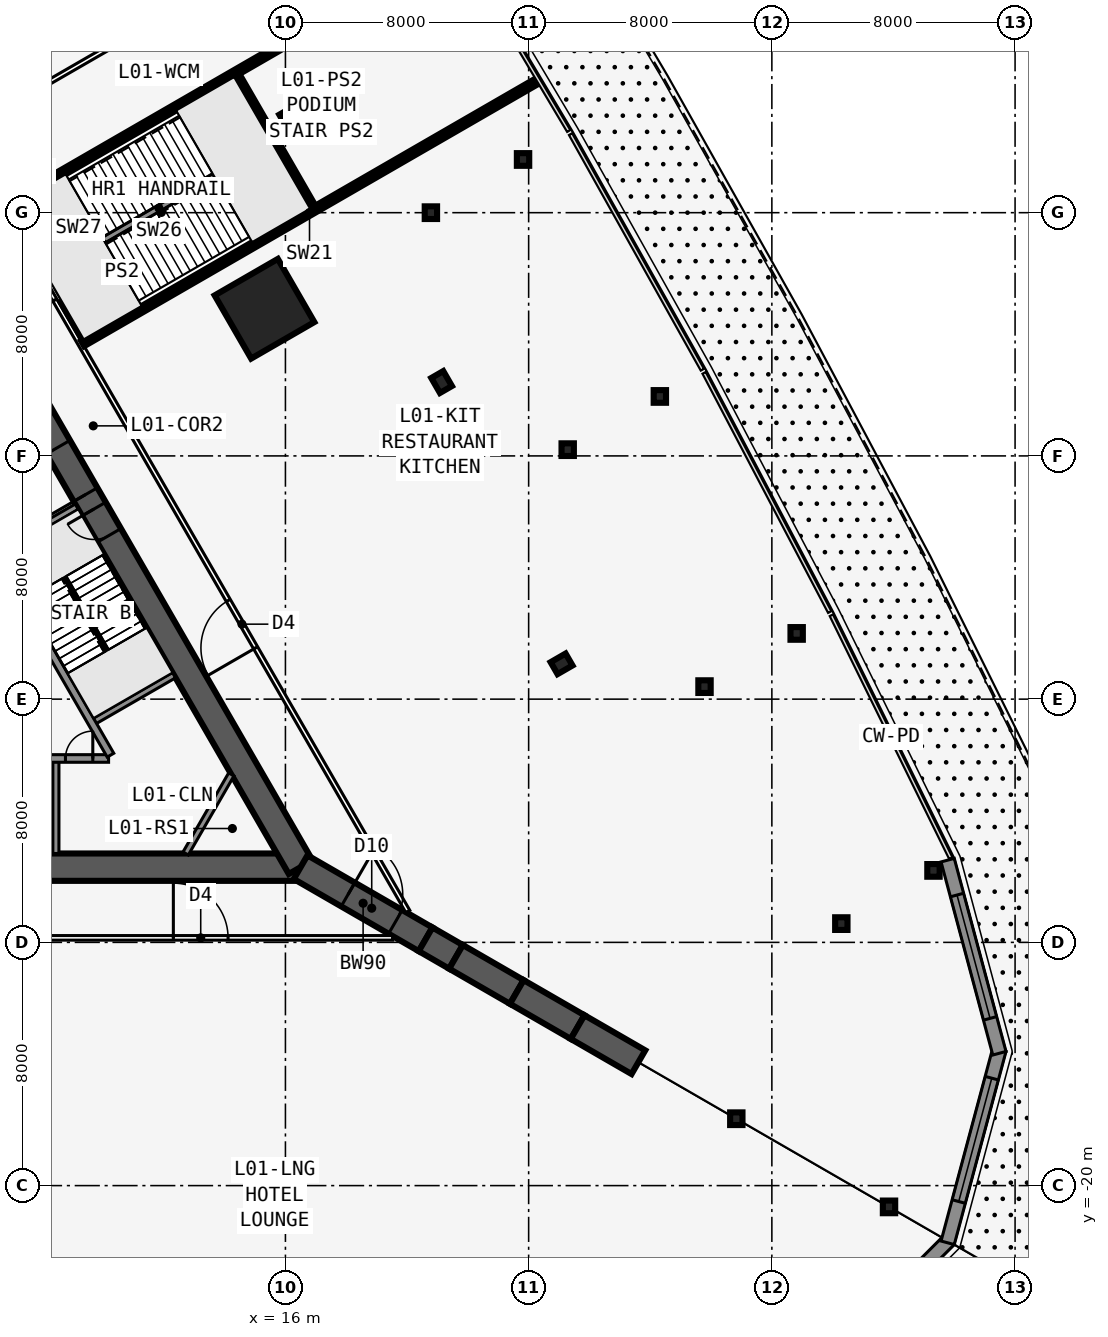
"""IFC4 building model, lengths in metres.
Left out: names, types, materials, properties, quantities, classifications, styles, units other than length and angle.
Written with IfcOpenShell. Run it as: python <this file> out.ifc"""

import sys

from ifc_helpers import new_model, si_unit, direction, frame, frame_2d, origin, origin_2d, place, context, subcontext, project, spatial, rectangle, i_section, extrude, element, fill, save


model = new_model("IFC4")
c1 = context("Model", 3, precision=1e-05, world=origin(), true_north=direction((0.0, 1.0)))
c2 = subcontext(c1, "Body", "Model", "MODEL_VIEW")
j1 = project(units=[si_unit("LENGTHUNIT", "METRE"), si_unit("PLANEANGLEUNIT", "RADIAN")], contexts=[c1])
p1 = place(None, origin())
s1 = spatial("IfcSite", under=j1, at=p1, CompositionType="ELEMENT")
p2 = place(p1, origin())
s2 = spatial("IfcBuilding", under=s1, at=p2, CompositionType="ELEMENT")
p3 = place(p2, frame((0.0, 0.0, 6.0)))
s3 = spatial("IfcBuildingStorey", under=s2, at=p3, CompositionType="ELEMENT", Elevation=6.0)
p4 = place(p3, frame((-16.5, -9.526, 0.0), z_axis=(0.0, 0.0, 1.0), x_axis=(1.0, 0.0, 0.0)))
e1 = element("IfcWall", 1, at=p4, inside=s3, PredefinedType="SHEAR", context=c2, shape_type="SweptSolid", body=[
    extrude(rectangle(XDim=33.0, YDim=0.9, at=frame_2d((16.5, 0.0))), origin(), (0.0, 0.0, 1.0), 5.0),
])
p5 = place(p4, frame((14.05, 0.0, 0.0)))
e2 = element("IfcOpeningElement", 2, at=p5, cuts=e1, PredefinedType="OPENING", context=c2, shape_type="SweptSolid", body=[
    extrude(rectangle(XDim=1.8, YDim=2.13, at=frame_2d((0.9, 1.065))), frame((0.0, 0.46, 0.0), z_axis=(0.0, -1.0, 0.0), x_axis=(1.0, 0.0, 0.0)), (0.0, 0.0, 1.0), 0.92),
])
p6 = place(p3, frame((-0.55, -5.951, 0.0), z_axis=(0.0, 0.0, 1.0), x_axis=(1.0, 0.0, 0.0)))
e3 = element("IfcWall", 3, at=p6, inside=s3, PredefinedType="SOLIDWALL", context=c2, shape_type="SweptSolid", body=[
    extrude(rectangle(XDim=10.733, YDim=0.25, at=frame_2d((5.366, 0.0))), origin(), (0.0, 0.0, 1.0), 4.75),
])
p7 = place(p6, frame((9.314, 0.0, 0.0)))
e4 = element("IfcOpeningElement", 4, at=p7, cuts=e3, PredefinedType="OPENING", context=c2, shape_type="SweptSolid", body=[
    extrude(rectangle(XDim=0.9, YDim=2.13, at=frame_2d((0.45, 1.065))), frame((0.0, 0.135, 0.0), z_axis=(0.0, -1.0, 0.0), x_axis=(1.0, 0.0, 0.0)), (0.0, 0.0, 1.0), 0.27),
])
p8 = place(p6, frame((1.05, 0.0, 0.0)))
e5 = element("IfcOpeningElement", 5, at=p8, cuts=e3, PredefinedType="OPENING", context=c2, shape_type="SweptSolid", body=[
    extrude(rectangle(XDim=1.1, YDim=2.13, at=frame_2d((0.55, 1.065))), frame((0.0, 0.135, 0.0), z_axis=(0.0, -1.0, 0.0), x_axis=(1.0, 0.0, 0.0)), (0.0, 0.0, 1.0), 0.27),
])
p9 = place(p6, frame((4.05, 0.0, 0.0)))
e6 = element("IfcOpeningElement", 6, at=p9, cuts=e3, PredefinedType="OPENING", context=c2, shape_type="SweptSolid", body=[
    extrude(rectangle(XDim=1.1, YDim=2.13, at=frame_2d((0.55, 1.065))), frame((0.0, 0.135, 0.0), z_axis=(0.0, -1.0, 0.0), x_axis=(1.0, 0.0, 0.0)), (0.0, 0.0, 1.0), 0.27),
])
p10 = place(p3, frame((8.45, -5.951, 0.0), z_axis=(0.0, 0.0, 1.0), x_axis=(0.0, -1.0, 0.0)))
e7 = element("IfcWall", 7, at=p10, inside=s3, PredefinedType="SOLIDWALL", context=c2, shape_type="SweptSolid", body=[
    extrude(rectangle(XDim=3.125, YDim=0.2, at=frame_2d((1.562, 0.0))), origin(), (0.0, 0.0, 1.0), 4.75),
])
p11 = place(p3, frame((16.5, -9.526, 0.0), z_axis=(0.0, 0.0, 1.0), x_axis=(-0.499999749417, 0.866025548458, 0.0)))
e8 = element("IfcWall", 8, at=p11, inside=s3, PredefinedType="SHEAR", context=c2, shape_type="SweptSolid", body=[
    extrude(rectangle(XDim=33.0, YDim=0.9, at=frame_2d((16.5, 0.0))), origin(), (0.0, 0.0, 1.0), 5.0),
])
p12 = place(p11, frame((14.15, 0.0, 0.0)))
e9 = element("IfcOpeningElement", 9, at=p12, cuts=e8, PredefinedType="OPENING", context=c2, shape_type="SweptSolid", body=[
    extrude(rectangle(XDim=1.8, YDim=2.13, at=frame_2d((0.9, 1.065))), frame((0.0, 0.46, 0.0), z_axis=(0.0, -1.0, 0.0), x_axis=(1.0, 0.0, 0.0)), (0.0, 0.0, 1.0), 0.92),
])
p13 = place(p11, frame((12.6, 0.0, 0.0)))
e10 = element("IfcOpeningElement", 10, at=p13, cuts=e8, PredefinedType="OPENING", context=c2, shape_type="SweptSolid", body=[
    extrude(rectangle(XDim=1.0, YDim=2.13, at=frame_2d((0.5, 1.065))), frame((0.0, 0.46, 0.0), z_axis=(0.0, -1.0, 0.0), x_axis=(1.0, 0.0, 0.0)), (0.0, 0.0, 1.0), 0.92),
])
p14 = place(p3, frame((10.245, -5.843, 0.0), z_axis=(0.0, 0.0, 1.0), x_axis=(-0.499993009313, 0.866029439822, 0.0)))
e11 = element("IfcWall", 11, at=p14, inside=s3, PredefinedType="SOLIDWALL", context=c2, shape_type="SweptSolid", body=[
    extrude(rectangle(XDim=7.733, YDim=0.25, at=frame_2d((3.866, 0.0))), origin(), (0.0, 0.0, 1.0), 4.75),
])
for number, where, z_axis, x_axis in (
    (12, (9.629, -4.775, 0.0), (0.0, 0.0, 1.0), (0.866, 0.5, 0.0)),
    (13, (6.429, 0.767, 0.0), (0.0, 0.0, 1.0), (0.866, 0.5, 0.0)),
):
    element("IfcWall", number, at=place(p3, frame(where, z_axis=z_axis, x_axis=x_axis)), inside=s3, PredefinedType="SOLIDWALL", context=c2, shape_type="SweptSolid", body=[
        extrude(rectangle(XDim=3.125, YDim=0.2, at=frame_2d((1.562, 0.0))), origin(), (0.0, 0.0, 1.0), 4.75),
    ])
p15 = place(p3, frame((16.5, -9.526, 0.0), z_axis=(0.0, 0.0, 1.0), x_axis=(0.866031398331, -0.499989616998, 0.0)))
e14 = element("IfcWall", 14, at=p15, inside=s3, PredefinedType="SHEAR", context=c2, shape_type="SweptSolid", body=[
    extrude(rectangle(XDim=4.746, YDim=0.9, at=frame_2d((2.373, 0.0))), origin(), (0.0, 0.0, 1.0), 5.0),
])
p16 = place(p15, frame((1.8, 0.0, 0.0)))
e15 = element("IfcOpeningElement", 15, at=p16, cuts=e14, PredefinedType="OPENING", context=c2, shape_type="SweptSolid", body=[
    extrude(rectangle(XDim=1.8, YDim=2.13, at=frame_2d((0.9, 1.065))), frame((0.0, 0.46, 0.0), z_axis=(0.0, -1.0, 0.0), x_axis=(1.0, 0.0, 0.0)), (0.0, 0.0, 1.0), 0.92),
])
p17 = place(p3, frame((20.61, -11.899, 0.0), z_axis=(0.0, 0.0, 1.0), x_axis=(0.866009537788, -0.500027479704, 0.0)))
e16 = element("IfcWall", 16, at=p17, inside=s3, PredefinedType="SHEAR", context=c2, shape_type="SweptSolid", body=[
    extrude(rectangle(XDim=1.155, YDim=0.9, at=frame_2d((0.577, 0.0))), origin(), (0.0, 0.0, 1.0), 5.0),
])
for number, where, z_axis, x_axis in (
    (17, (21.61, -12.477, 0.0), (0.0, 0.0, 1.0), (0.866, -0.5, 0.0)),
    (18, (23.61, -13.631, 0.0), (0.0, 0.0, 1.0), (0.866, -0.5, 0.0)),
    (19, (25.61, -14.786, 0.0), (0.0, 0.0, 1.0), (0.866, -0.5, 0.0)),
):
    element("IfcWall", number, at=place(p3, frame(where, z_axis=z_axis, x_axis=x_axis)), inside=s3, PredefinedType="SHEAR", context=c2, shape_type="SweptSolid", body=[
        extrude(rectangle(XDim=2.309, YDim=0.9, at=frame_2d((1.155, 0.0))), origin(), (0.0, 0.0, 1.0), 5.0),
    ])
for number, where, z_axis, x_axis in (
    (20, (15.0, -20.303, 0.0), (0.0, 0.0, 1.0), (1.0, 0.0, 0.0)),
    (21, (25.083, -2.839, 0.0), (0.0, 0.0, 1.0), (-0.5, 0.866, 0.0)),
    (22, (21.137, 6.43, 0.0), (0.0, 0.0, 1.0), (0.866, 0.5, 0.0)),
    (23, (16.137, 15.09, 0.0), (0.0, 0.0, 1.0), (0.866, 0.5, 0.0)),
):
    element("IfcColumn", number, at=place(p3, frame(where, z_axis=z_axis, x_axis=x_axis)), inside=s3, PredefinedType="COLUMN", context=c2, shape_type="SweptSolid", body=[
        extrude(i_section(OverallWidth=0.455, OverallDepth=0.569, WebThickness=0.078, FlangeThickness=0.125, at=origin_2d()), origin(), (0.0, 0.0, 1.0), 5.0),
    ])
for number, where, z_axis, x_axis in (
    (24, (30.831, -17.8, 0.0), (0.0, 0.0, 1.0), (1.0, 0.0, 0.0)),
    (25, (35.854, -20.7, 0.0), (0.0, 0.0, 1.0), (1.0, 0.0, 0.0)),
    (26, (29.785, -3.588, 0.0), (0.0, 0.0, 1.0), (1.0, 0.0, 0.0)),
    (27, (34.285, -11.383, 0.0), (0.0, 0.0, 1.0), (1.0, 0.0, 0.0)),
    (28, (25.285, 4.206, 0.0), (0.0, 0.0, 1.0), (1.0, 0.0, 0.0)),
    (29, (20.785, 12.0, 0.0), (0.0, 0.0, 1.0), (1.0, 0.0, 0.0)),
    (30, (32.816, -1.838, 0.0), (0.0, 0.0, 1.0), (1.0, 0.0, 0.0)),
    (31, (37.316, -9.633, 0.0), (0.0, 0.0, 1.0), (1.0, 0.0, 0.0)),
    (32, (28.316, 5.956, 0.0), (0.0, 0.0, 1.0), (1.0, 0.0, 0.0)),
    (33, (23.816, 13.75, 0.0), (0.0, 0.0, 1.0), (1.0, 0.0, 0.0)),
):
    element("IfcColumn", number, at=place(p3, frame(where, z_axis=z_axis, x_axis=x_axis)), inside=s3, PredefinedType="COLUMN", context=c2, shape_type="SweptSolid", body=[
        extrude(i_section(OverallWidth=0.406, OverallDepth=0.417, WebThickness=0.03, FlangeThickness=0.048, at=origin_2d()), origin(), (0.0, 0.0, 1.0), 5.0),
    ])
p18 = place(p3, frame((15.312, 8.84, 0.0), z_axis=(0.0, 0.0, 1.0), x_axis=(0.866025403784, 0.5, 0.0)))
e34 = element("IfcColumn", 34, at=p18, inside=s3, PredefinedType="COLUMN", context=c2, shape_type="SweptSolid", body=[
    extrude(rectangle(XDim=2.4, YDim=2.4, at=origin_2d()), origin(), (0.0, 0.0, 1.0), 5.0),
])
p19 = place(p3, frame((33.192, -26.429, 0.0), z_axis=(0.0, 0.0, 1.0), x_axis=(0.7070882144, 0.707125347486, 0.0)))
e35 = element("IfcWall", 35, at=p19, inside=s3, PredefinedType="SOLIDWALL", context=c2, shape_type="SweptSolid", body=[
    extrude(rectangle(XDim=6.575, YDim=0.45, at=frame_2d((3.287, 0.0))), origin(), (0.0, 0.0, 1.0), 4.75),
])
p20 = place(p19, frame((0.969, 0.0, 0.6)))
e36 = element("IfcOpeningElement", 36, at=p20, cuts=e35, PredefinedType="OPENING", context=c2, shape_type="SweptSolid", body=[
    extrude(rectangle(XDim=4.2, YDim=3.2, at=frame_2d((2.1, 1.6))), frame((0.0, 0.235, 0.0), z_axis=(0.0, -1.0, 0.0), x_axis=(1.0, 0.0, 0.0)), (0.0, 0.0, 1.0), 0.47),
])
p21 = place(p3, frame((37.783, -21.881, 0.0), z_axis=(0.0, 0.0, 1.0), x_axis=(0.258813420722, 0.96592733332, 0.0)))
e37 = element("IfcWall", 37, at=p21, inside=s3, PredefinedType="SOLIDWALL", context=c2, shape_type="SweptSolid", body=[
    extrude(rectangle(XDim=6.575, YDim=0.45, at=frame_2d((3.288, 0.0))), origin(), (0.0, 0.0, 1.0), 4.75),
])
p22 = place(p21, frame((1.406, 0.0, 0.6)))
e38 = element("IfcOpeningElement", 38, at=p22, cuts=e37, PredefinedType="OPENING", context=c2, shape_type="SweptSolid", body=[
    extrude(rectangle(XDim=4.2, YDim=3.2, at=frame_2d((2.1, 1.6))), frame((0.0, 0.235, 0.0), z_axis=(0.0, -1.0, 0.0), x_axis=(1.0, 0.0, 0.0)), (0.0, 0.0, 1.0), 0.47),
])
p23 = place(p3, frame((39.484, -15.647, 0.0), z_axis=(0.0, 0.0, 1.0), x_axis=(-0.258813420722, 0.96592733332, 0.0)))
e39 = element("IfcWall", 39, at=p23, inside=s3, PredefinedType="SOLIDWALL", context=c2, shape_type="SweptSolid", body=[
    extrude(rectangle(XDim=6.575, YDim=0.45, at=frame_2d((3.288, 0.0))), origin(), (0.0, 0.0, 1.0), 4.75),
])
p24 = place(p23, frame((1.188, 0.0, 0.6)))
e40 = element("IfcOpeningElement", 40, at=p24, cuts=e39, PredefinedType="OPENING", context=c2, shape_type="SweptSolid", body=[
    extrude(rectangle(XDim=4.2, YDim=3.2, at=frame_2d((2.1, 1.6))), frame((0.0, 0.235, 0.0), z_axis=(0.0, -1.0, 0.0), x_axis=(1.0, 0.0, 0.0)), (0.0, 0.0, 1.0), 0.47),
])
p25 = place(p3, frame((-19.527, -11.851, 0.0), z_axis=(0.0, 0.0, 1.0), x_axis=(1.0, 0.0, 0.0)))
e41 = element("IfcWall", 41, at=p25, inside=s3, PredefinedType="PARTITIONING", context=c2, shape_type="SweptSolid", body=[
    extrude(rectangle(XDim=39.054, YDim=0.15, at=frame_2d((19.527, 0.0))), origin(), (0.0, 0.0, 1.0), 3.808),
])
p26 = place(p25, frame((8.013, 0.0, 0.0)))
e42 = element("IfcOpeningElement", 42, at=p26, cuts=e41, PredefinedType="OPENING", context=c2, shape_type="SweptSolid", body=[
    extrude(rectangle(XDim=1.8, YDim=2.13, at=frame_2d((0.9, 1.065))), frame((0.0, 0.085, 0.0), z_axis=(0.0, -1.0, 0.0), x_axis=(1.0, 0.0, 0.0)), (0.0, 0.0, 1.0), 0.17),
])
p27 = place(p25, frame((18.627, 0.0, 0.0)))
e43 = element("IfcOpeningElement", 43, at=p27, cuts=e41, PredefinedType="OPENING", context=c2, shape_type="SweptSolid", body=[
    extrude(rectangle(XDim=1.8, YDim=2.13, at=frame_2d((0.9, 1.065))), frame((0.0, 0.085, 0.0), z_axis=(0.0, -1.0, 0.0), x_axis=(1.0, 0.0, 0.0)), (0.0, 0.0, 1.0), 0.17),
])
p28 = place(p25, frame((23.227, 0.0, 0.0)))
e44 = element("IfcOpeningElement", 44, at=p28, cuts=e41, PredefinedType="OPENING", context=c2, shape_type="SweptSolid", body=[
    extrude(rectangle(XDim=1.8, YDim=2.13, at=frame_2d((0.9, 1.065))), frame((0.0, 0.085, 0.0), z_axis=(0.0, -1.0, 0.0), x_axis=(1.0, 0.0, 0.0)), (0.0, 0.0, 1.0), 0.17),
])
p29 = place(p25, frame((31.841, 0.0, 0.0)))
e45 = element("IfcOpeningElement", 45, at=p29, cuts=e41, PredefinedType="OPENING", context=c2, shape_type="SweptSolid", body=[
    extrude(rectangle(XDim=1.8, YDim=2.13, at=frame_2d((0.9, 1.065))), frame((0.0, 0.085, 0.0), z_axis=(0.0, -1.0, 0.0), x_axis=(1.0, 0.0, 0.0)), (0.0, 0.0, 1.0), 0.17),
])
p30 = place(p3, frame((20.027, -10.985, 0.0), z_axis=(0.0, 0.0, 1.0), x_axis=(-0.500001677587, 0.866024435227, 0.0)))
e46 = element("IfcWall", 46, at=p30, inside=s3, PredefinedType="PARTITIONING", context=c2, shape_type="SweptSolid", body=[
    extrude(rectangle(XDim=39.054, YDim=0.15, at=frame_2d((19.527, 0.0))), origin(), (0.0, 0.0, 1.0), 3.808),
])
p31 = place(p30, frame((10.013, 0.0, 0.0)))
e47 = element("IfcOpeningElement", 47, at=p31, cuts=e46, PredefinedType="OPENING", context=c2, shape_type="SweptSolid", body=[
    extrude(rectangle(XDim=1.8, YDim=2.13, at=frame_2d((0.9, 1.065))), frame((0.0, 0.085, 0.0), z_axis=(0.0, -1.0, 0.0), x_axis=(1.0, 0.0, 0.0)), (0.0, 0.0, 1.0), 0.17),
])
p32 = place(p30, frame((23.227, 0.0, 0.0)))
e48 = element("IfcOpeningElement", 48, at=p32, cuts=e46, PredefinedType="OPENING", context=c2, shape_type="SweptSolid", body=[
    extrude(rectangle(XDim=1.8, YDim=2.13, at=frame_2d((0.9, 1.065))), frame((0.0, 0.085, 0.0), z_axis=(0.0, -1.0, 0.0), x_axis=(1.0, 0.0, 0.0)), (0.0, 0.0, 1.0), 0.17),
])
p33 = place(p30, frame((27.627, 0.0, 0.0)))
e49 = element("IfcOpeningElement", 49, at=p33, cuts=e46, PredefinedType="OPENING", context=c2, shape_type="SweptSolid", body=[
    extrude(rectangle(XDim=1.0, YDim=2.13, at=frame_2d((0.5, 1.065))), frame((0.0, 0.085, 0.0), z_axis=(0.0, -1.0, 0.0), x_axis=(1.0, 0.0, 0.0)), (0.0, 0.0, 1.0), 0.17),
])
p34 = place(p30, frame((30.527, 0.0, 0.0)))
e50 = element("IfcOpeningElement", 50, at=p34, cuts=e46, PredefinedType="OPENING", context=c2, shape_type="SweptSolid", body=[
    extrude(rectangle(XDim=1.0, YDim=2.13, at=frame_2d((0.5, 1.065))), frame((0.0, 0.085, 0.0), z_axis=(0.0, -1.0, 0.0), x_axis=(1.0, 0.0, 0.0)), (0.0, 0.0, 1.0), 0.17),
])
p35 = place(p30, frame((33.277, 0.0, 0.0)))
e51 = element("IfcOpeningElement", 51, at=p35, cuts=e46, PredefinedType="OPENING", context=c2, shape_type="SweptSolid", body=[
    extrude(rectangle(XDim=1.0, YDim=2.13, at=frame_2d((0.5, 1.065))), frame((0.0, 0.085, 0.0), z_axis=(0.0, -1.0, 0.0), x_axis=(1.0, 0.0, 0.0)), (0.0, 0.0, 1.0), 0.17),
])
p36 = place(p30, frame((36.39, 0.0, 0.0)))
e52 = element("IfcOpeningElement", 52, at=p36, cuts=e46, PredefinedType="OPENING", context=c2, shape_type="SweptSolid", body=[
    extrude(rectangle(XDim=1.0, YDim=2.13, at=frame_2d((0.5, 1.065))), frame((0.0, 0.085, 0.0), z_axis=(0.0, -1.0, 0.0), x_axis=(1.0, 0.0, 0.0)), (0.0, 0.0, 1.0), 0.17),
])
p37 = place(p3, frame((9.329, 7.695, 0.0), z_axis=(0.0, 0.0, 1.0), x_axis=(0.866030143687, 0.499991790157, 0.0)))
e53 = element("IfcWall", 53, at=p37, inside=s3, PredefinedType="SHEAR", context=c2, shape_type="SweptSolid", body=[
    extrude(rectangle(XDim=17.236, YDim=0.2, at=frame_2d((8.618, 0.0))), origin(), (0.0, 0.0, 1.0), 5.0),
])
p38 = place(p3, frame((6.729, 12.198, 0.0), z_axis=(0.0, 0.0, 1.0), x_axis=(0.866023831254, 0.500002723692, 0.0)))
e54 = element("IfcWall", 54, at=p38, inside=s3, PredefinedType="SHEAR", context=c2, shape_type="SweptSolid", body=[
    extrude(rectangle(XDim=17.167, YDim=0.2, at=frame_2d((8.583, 0.0))), origin(), (0.0, 0.0, 1.0), 5.0),
])
p39 = place(p3, frame((5.329, 14.623, 0.0), z_axis=(0.0, 0.0, 1.0), x_axis=(0.866023280993, 0.500003676764, 0.0)))
e55 = element("IfcWall", 55, at=p39, inside=s3, PredefinedType="PARTITIONING", context=c2, shape_type="SweptSolid", body=[
    extrude(rectangle(XDim=17.033, YDim=0.15, at=frame_2d((8.517, 0.0))), origin(), (0.0, 0.0, 1.0), 3.808),
])
p40 = place(p3, frame((3.829, 17.221, 0.0), z_axis=(0.0, 0.0, 1.0), x_axis=(0.86602357085, 0.500003174723, 0.0)))
e56 = element("IfcWall", 56, at=p40, inside=s3, PredefinedType="PARTITIONING", context=c2, shape_type="SweptSolid", body=[
    extrude(rectangle(XDim=16.914, YDim=0.15, at=frame_2d((8.457, 0.0))), origin(), (0.0, 0.0, 1.0), 4.75),
])
p41 = place(p3, frame((14.219, -6.476, 0.0), z_axis=(0.0, 0.0, 1.0), x_axis=(-0.499952404951, -0.866052881055, 0.0)))
e57 = element("IfcWall", 57, at=p41, inside=s3, PredefinedType="SOLIDWALL", context=c2, shape_type="SweptSolid", body=[
    extrude(rectangle(XDim=3.002, YDim=0.2, at=frame_2d((1.501, 0.0))), origin(), (0.0, 0.0, 1.0), 4.75),
])
p42 = place(p3, frame((10.135, -2.401, 0.0), z_axis=(0.0, 0.0, 1.0), x_axis=(-0.499992232847, 0.866029888106, 0.0)))
e58 = element("IfcWall", 58, at=p42, inside=s3, PredefinedType="SOLIDWALL", context=c2, shape_type="SweptSolid", body=[
    extrude(rectangle(XDim=2.794, YDim=0.1, at=frame_2d((1.397, 0.0))), origin(), (0.0, 0.0, 1.0), 5.0),
])
p43 = place(p3, frame((16.949, 12.095, 0.0), z_axis=(0.0, 0.0, 1.0), x_axis=(-0.499992051641, 0.866029992723, 0.0)))
e59 = element("IfcWall", 59, at=p43, inside=s3, PredefinedType="SHEAR", context=c2, shape_type="SweptSolid", body=[
    extrude(rectangle(XDim=5.2, YDim=0.2, at=frame_2d((2.6, 0.0))), origin(), (0.0, 0.0, 1.0), 5.0),
])
p44 = place(p3, frame((9.322, 7.807, 0.0), z_axis=(0.0, 0.0, 1.0), x_axis=(-0.500060622324, 0.86599040064, 0.0)))
e60 = element("IfcWall", 60, at=p44, inside=s3, PredefinedType="SOLIDWALL", context=c2, shape_type="SweptSolid", body=[
    extrude(rectangle(XDim=1.5, YDim=0.1, at=frame_2d((0.75, 0.0))), origin(), (0.0, 0.0, 1.0), 5.0),
])
p45 = place(p3, frame((10.023, 11.098, 0.0), z_axis=(0.0, 0.0, 1.0), x_axis=(0.866031452229, 0.49998952364, 0.0)))
e61 = element("IfcWall", 61, at=p45, inside=s3, PredefinedType="SOLIDWALL", context=c2, shape_type="SweptSolid", body=[
    extrude(rectangle(XDim=4.194, YDim=0.2, at=frame_2d((2.097, 0.0))), origin(), (0.0, 0.0, 1.0), 5.0),
])
p46 = place(p22, origin())
e62 = element("IfcWindow", 62, at=p46, inside=s3, PartitioningType="SINGLE_PANEL", PredefinedType="WINDOW", context=c2, shape_type="SweptSolid", body=[
    extrude(rectangle(XDim=4.2, YDim=3.2, at=frame_2d((2.1, 1.6))), frame((0.0, 0.03, 0.0), z_axis=(0.0, -1.0, 0.0), x_axis=(1.0, 0.0, 0.0)), (0.0, 0.0, 1.0), 0.06),
])
fill(e38, e62)
p47 = place(p24, origin())
e63 = element("IfcWindow", 63, at=p47, inside=s3, PartitioningType="SINGLE_PANEL", PredefinedType="WINDOW", context=c2, shape_type="SweptSolid", body=[
    extrude(rectangle(XDim=4.2, YDim=3.2, at=frame_2d((2.1, 1.6))), frame((0.0, 0.03, 0.0), z_axis=(0.0, -1.0, 0.0), x_axis=(1.0, 0.0, 0.0)), (0.0, 0.0, 1.0), 0.06),
])
fill(e40, e63)
p48 = place(p29, origin())
e64 = element("IfcDoor", 64, at=p48, inside=s3, OperationType="DOUBLE_DOOR_SINGLE_SWING", PredefinedType="DOOR", context=c2, shape_type="SweptSolid", body=[
    extrude(rectangle(XDim=1.8, YDim=2.13, at=frame_2d((0.9, 1.065))), frame((0.0, 0.025, 0.0), z_axis=(0.0, -1.0, 0.0), x_axis=(1.0, 0.0, 0.0)), (0.0, 0.0, 1.0), 0.05),
])
fill(e45, e64)
p49 = place(p31, origin())
e65 = element("IfcDoor", 65, at=p49, inside=s3, OperationType="DOUBLE_DOOR_SINGLE_SWING", PredefinedType="DOOR", context=c2, shape_type="SweptSolid", body=[
    extrude(rectangle(XDim=1.8, YDim=2.13, at=frame_2d((0.9, 1.065))), frame((0.0, 0.025, 0.0), z_axis=(0.0, -1.0, 0.0), x_axis=(1.0, 0.0, 0.0)), (0.0, 0.0, 1.0), 0.05),
])
fill(e47, e65)
p50 = place(p32, origin())
e66 = element("IfcDoor", 66, at=p50, inside=s3, OperationType="DOUBLE_DOOR_SINGLE_SWING", PredefinedType="DOOR", context=c2, shape_type="SweptSolid", body=[
    extrude(rectangle(XDim=1.8, YDim=2.13, at=frame_2d((0.9, 1.065))), frame((0.0, 0.025, 0.0), z_axis=(0.0, -1.0, 0.0), x_axis=(1.0, 0.0, 0.0)), (0.0, 0.0, 1.0), 0.05),
])
fill(e48, e66)
p51 = place(p12, origin())
e67 = element("IfcDoor", 67, at=p51, inside=s3, OperationType="DOUBLE_DOOR_SINGLE_SWING", PredefinedType="DOOR", context=c2, shape_type="SweptSolid", body=[
    extrude(rectangle(XDim=1.8, YDim=2.13, at=frame_2d((0.9, 1.065))), frame((0.0, 0.025, 0.0), z_axis=(0.0, -1.0, 0.0), x_axis=(1.0, 0.0, 0.0)), (0.0, 0.0, 1.0), 0.05),
])
fill(e9, e67)
p52 = place(p13, origin())
e68 = element("IfcDoor", 68, at=p52, inside=s3, OperationType="SINGLE_SWING_RIGHT", PredefinedType="DOOR", context=c2, shape_type="SweptSolid", body=[
    extrude(rectangle(XDim=1.0, YDim=2.13, at=frame_2d((0.5, 1.065))), frame((0.0, 0.025, 0.0), z_axis=(0.0, -1.0, 0.0), x_axis=(1.0, 0.0, 0.0)), (0.0, 0.0, 1.0), 0.05),
])
fill(e10, e68)
p53 = place(p16, origin())
e69 = element("IfcDoor", 69, at=p53, inside=s3, OperationType="DOUBLE_DOOR_DOUBLE_SWING", PredefinedType="DOOR", context=c2, shape_type="SweptSolid", body=[
    extrude(rectangle(XDim=1.8, YDim=2.13, at=frame_2d((0.9, 1.065))), frame((0.0, 0.025, 0.0), z_axis=(0.0, -1.0, 0.0), x_axis=(1.0, 0.0, 0.0)), (0.0, 0.0, 1.0), 0.05),
])
fill(e15, e69)
p54 = place(p7, origin())
e70 = element("IfcDoor", 70, at=p54, inside=s3, OperationType="SINGLE_SWING_RIGHT", PredefinedType="DOOR", context=c2, shape_type="SweptSolid", body=[
    extrude(rectangle(XDim=0.9, YDim=2.13, at=frame_2d((0.45, 1.065))), frame((0.0, 0.025, 0.0), z_axis=(0.0, -1.0, 0.0), x_axis=(1.0, 0.0, 0.0)), (0.0, 0.0, 1.0), 0.05),
])
fill(e4, e70)
save(model, sys.argv[1])
